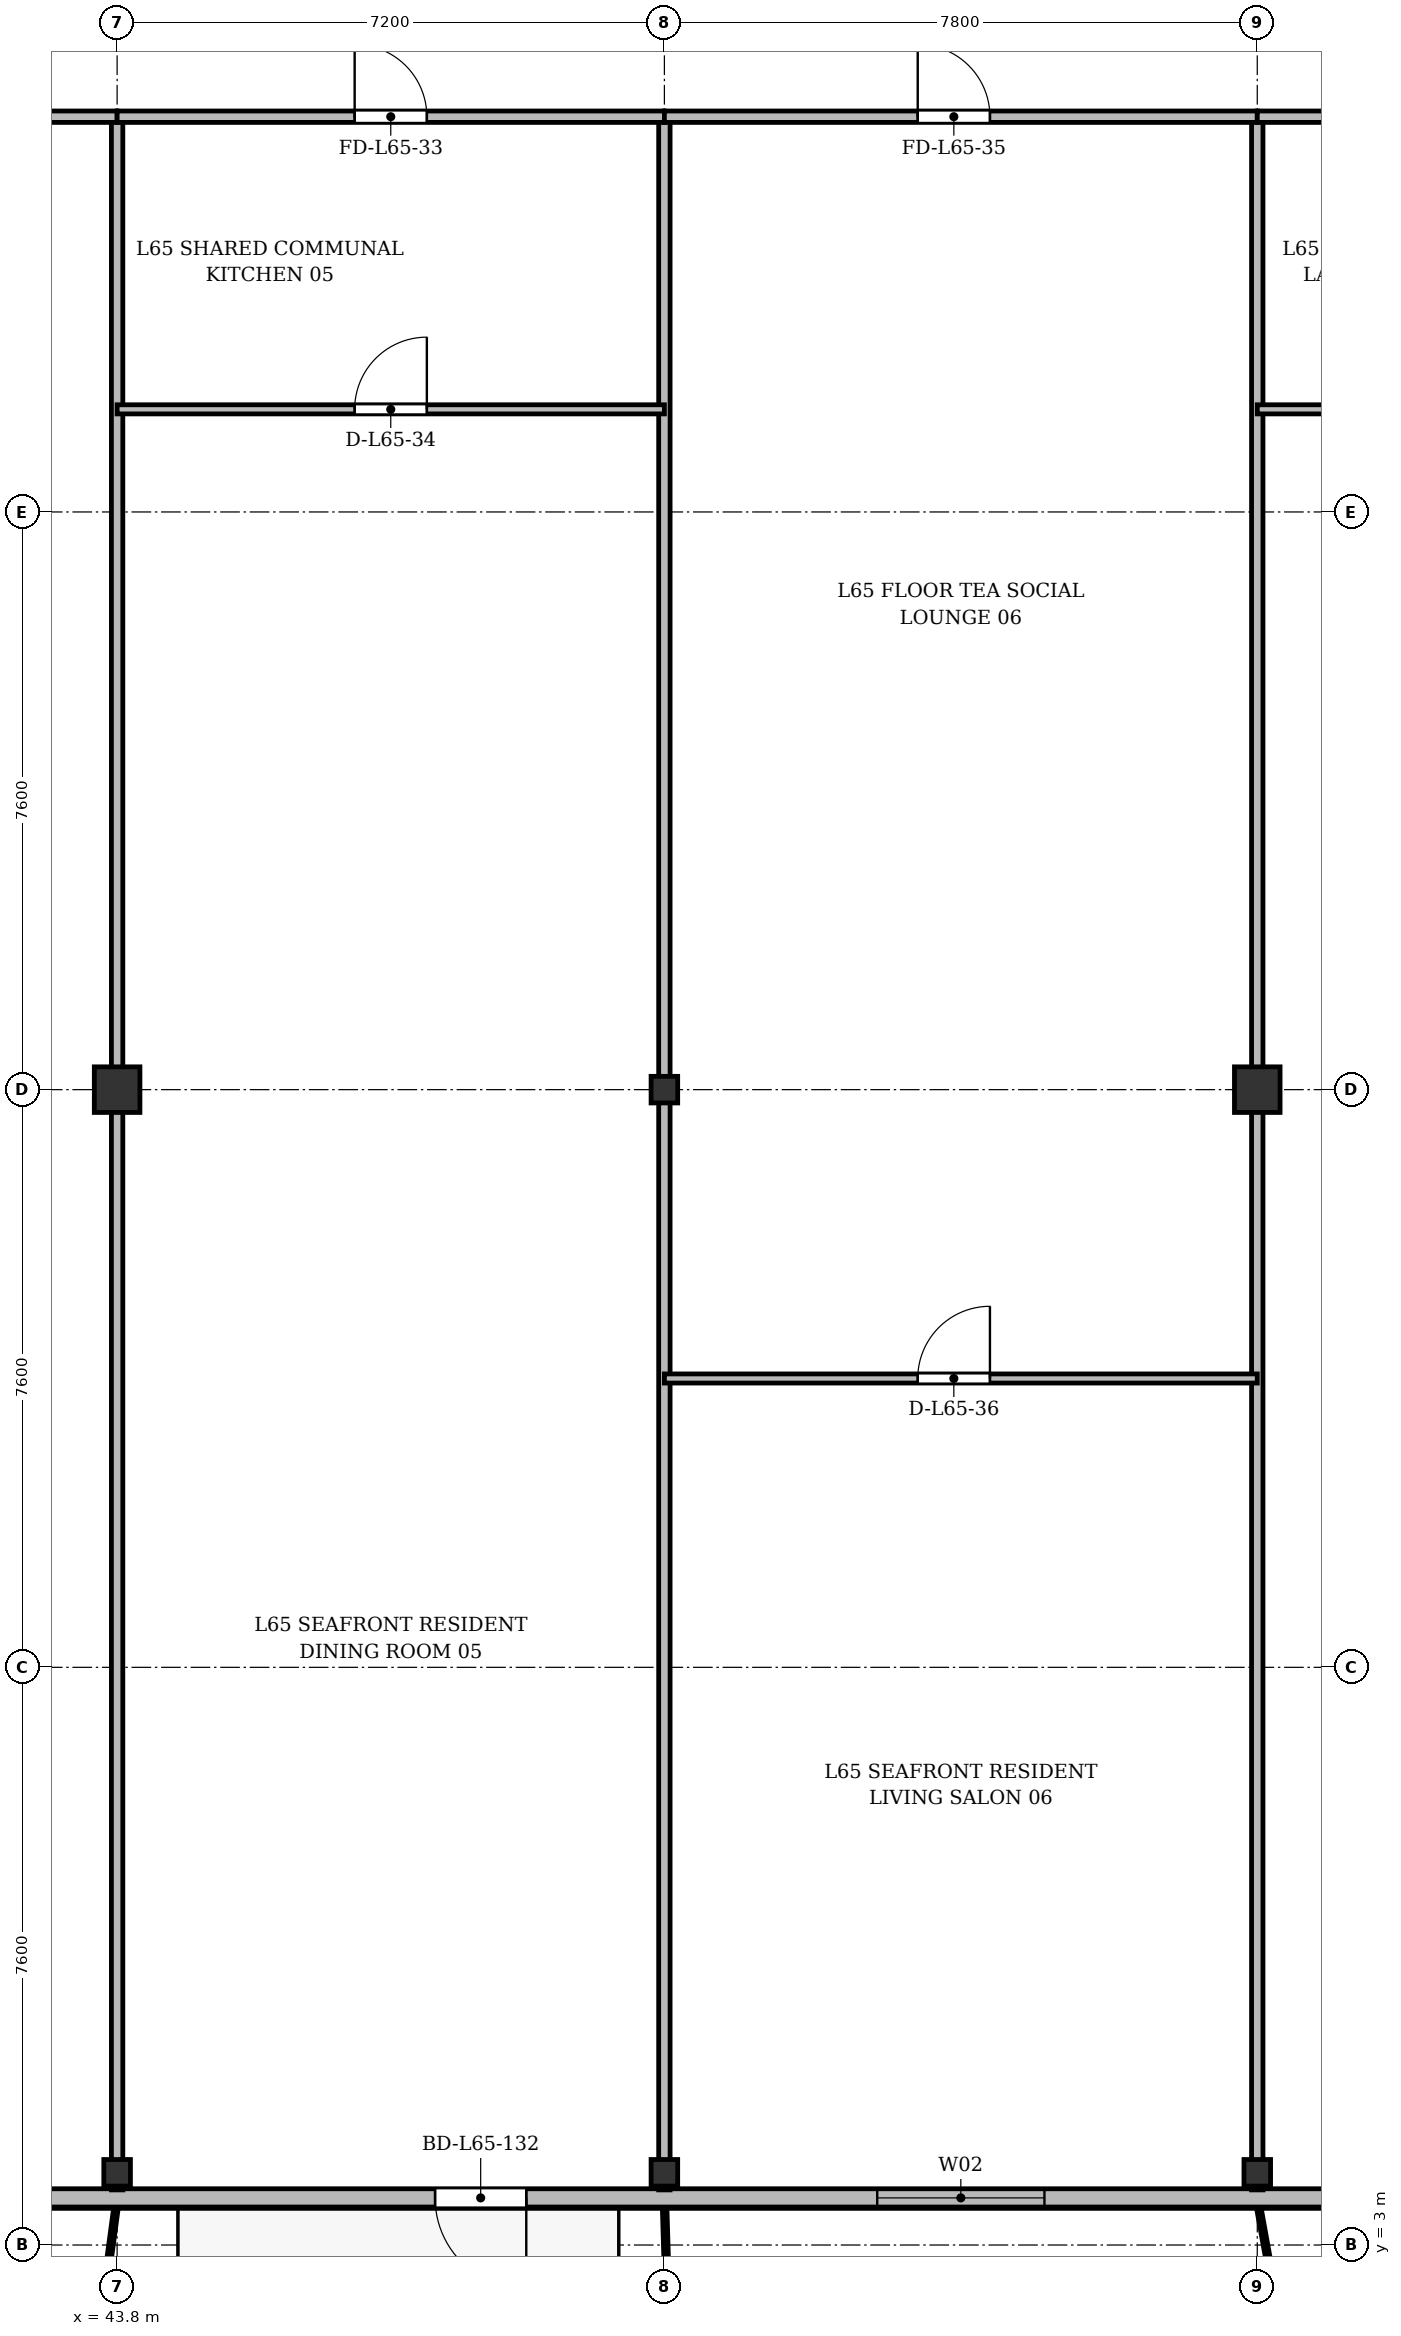
"""IFC4 building model, lengths in metres.
Left out: names, types, materials, properties, quantities, classifications, styles, units other than length and angle.
Written with IfcOpenShell. Run it as: python <this file> out.ifc"""

import sys

from ifc_helpers import new_model, si_unit, direction, frame, frame_2d, origin, origin_2d, place, context, subcontext, project, spatial, rectangle, i_section, extrude, source, transform, mapped, element, fill, save


model = new_model("IFC4")
c1 = context("Model", 3, precision=1e-05, world=origin(), true_north=direction((0.0, 1.0)))
c2 = subcontext(c1, "Body", "Model", "MODEL_VIEW")
j1 = project(units=[si_unit("LENGTHUNIT", "METRE"), si_unit("PLANEANGLEUNIT", "RADIAN")], contexts=[c1])
p1 = place(None, origin())
s1 = spatial("IfcSite", under=j1, at=p1, CompositionType="ELEMENT")
p2 = place(p1, origin())
s2 = spatial("IfcBuilding", under=s1, at=p2, CompositionType="ELEMENT")
p3 = place(p2, frame((0.0, 0.0, 252.3)))
s3 = spatial("IfcBuildingStorey", under=s2, at=p3, CompositionType="ELEMENT", Elevation=252.3)
m1 = source(origin(), c2, "Body", "SweptSolid", [
    extrude(i_section(OverallWidth=0.35, OverallDepth=0.35, WebThickness=0.018, FlangeThickness=0.028, at=origin_2d()), origin(), (0.0, 0.0, 1.0), 3.6),
])
p4 = place(p3, frame((43.8, 3.95, 0.0), z_axis=(0.0, 0.0, 1.0), x_axis=(1.0, 0.0, 0.0)))
e1 = element("IfcColumn", 1, at=p4, inside=s3, PredefinedType="COLUMN", context=c2, shape_type="MappedRepresentation", body=[
    mapped(m1, transform((0.0, 0.0, 0.0), x_axis=(1.0, 0.0, 0.0), y_axis=(0.0, 1.0, 0.0), z_axis=(0.0, 0.0, 1.0), scale=1.0)),
])
m2 = source(origin(), c2, "Body", "SweptSolid", [
    extrude(rectangle(XDim=0.6, YDim=0.6, at=origin_2d()), origin(), (0.0, 0.0, 1.0), 3.6),
])
p5 = place(p3, frame((43.8, 18.2, 0.0), z_axis=(0.0, 0.0, 1.0), x_axis=(1.0, 0.0, 0.0)))
e2 = element("IfcColumn", 2, at=p5, inside=s3, PredefinedType="COLUMN", context=c2, shape_type="MappedRepresentation", body=[
    mapped(m2, transform((0.0, 0.0, 0.0), x_axis=(1.0, 0.0, 0.0), y_axis=(0.0, 1.0, 0.0), z_axis=(0.0, 0.0, 1.0), scale=1.0)),
])
for number, where, z_axis, x_axis in (
    (3, (51.0, 3.95, 0.0), (0.0, 0.0, 1.0), (1.0, 0.0, 0.0)),
    (4, (51.0, 18.2, 0.0), (0.0, 0.0, 1.0), (1.0, 0.0, 0.0)),
    (5, (58.8, 3.95, 0.0), (0.0, 0.0, 1.0), (1.0, 0.0, 0.0)),
):
    element("IfcColumn", number, at=place(p3, frame(where, z_axis=z_axis, x_axis=x_axis)), inside=s3, PredefinedType="COLUMN", context=c2, shape_type="MappedRepresentation", body=[
        mapped(m1, transform((0.0, 0.0, 0.0), x_axis=(1.0, 0.0, 0.0), y_axis=(0.0, 1.0, 0.0), z_axis=(0.0, 0.0, 1.0), scale=1.0)),
    ])
p6 = place(p3, frame((58.8, 18.2, 0.0), z_axis=(0.0, 0.0, 1.0), x_axis=(1.0, 0.0, 0.0)))
e6 = element("IfcColumn", 6, at=p6, inside=s3, PredefinedType="COLUMN", context=c2, shape_type="MappedRepresentation", body=[
    mapped(m2, transform((0.0, 0.0, 0.0), x_axis=(1.0, 0.0, 0.0), y_axis=(0.0, 1.0, 0.0), z_axis=(0.0, 0.0, 1.0), scale=1.0)),
])
p7 = place(p3, frame((63.2, 3.62, 0.0), z_axis=(0.0, 0.0, 1.0), x_axis=(-1.0, 0.0, 0.0)))
e7 = element("IfcWall", 7, at=p7, inside=s3, PredefinedType="SOLIDWALL", context=c2, shape_type="SweptSolid", body=[
    extrude(rectangle(XDim=52.0, YDim=0.24, at=frame_2d((26.0, 0.0))), origin(), (0.0, 0.0, 1.0), 3.37),
])
p8 = place(p7, frame((1.345, 0.0, 0.9)))
e8 = element("IfcOpeningElement", 8, at=p8, cuts=e7, PredefinedType="OPENING", context=c2, shape_type="SweptSolid", body=[
    extrude(rectangle(XDim=1.8, YDim=1.8, at=frame_2d((0.9, 0.9))), frame((0.0, 0.13, 0.0), z_axis=(0.0, -1.0, 0.0), x_axis=(1.0, 0.0, 0.0)), (0.0, 0.0, 1.0), 0.26),
])
p9 = place(p7, frame((7.2, 0.0, 0.9)))
e9 = element("IfcOpeningElement", 9, at=p9, cuts=e7, PredefinedType="OPENING", context=c2, shape_type="SweptSolid", body=[
    extrude(rectangle(XDim=2.2, YDim=1.8, at=frame_2d((1.1, 0.9))), frame((0.0, 0.13, 0.0), z_axis=(0.0, -1.0, 0.0), x_axis=(1.0, 0.0, 0.0)), (0.0, 0.0, 1.0), 0.26),
])
p10 = place(p7, frame((14.017, 0.0, 0.0)))
e10 = element("IfcOpeningElement", 10, at=p10, cuts=e7, PredefinedType="OPENING", context=c2, shape_type="SweptSolid", body=[
    extrude(rectangle(XDim=1.2, YDim=2.2, at=frame_2d((0.6, 1.1))), frame((0.0, 0.13, 0.0), z_axis=(0.0, -1.0, 0.0), x_axis=(1.0, 0.0, 0.0)), (0.0, 0.0, 1.0), 0.26),
])
p11 = place(p7, frame((25.0, 0.0, 0.9)))
e11 = element("IfcOpeningElement", 11, at=p11, cuts=e7, PredefinedType="OPENING", context=c2, shape_type="SweptSolid", body=[
    extrude(rectangle(XDim=2.0, YDim=1.95, at=frame_2d((1.0, 0.975))), frame((0.0, 0.13, 0.0), z_axis=(0.0, -1.0, 0.0), x_axis=(1.0, 0.0, 0.0)), (0.0, 0.0, 1.0), 0.26),
])
p12 = place(p7, frame((35.375, 0.0, 0.9)))
e12 = element("IfcOpeningElement", 12, at=p12, cuts=e7, PredefinedType="OPENING", context=c2, shape_type="SweptSolid", body=[
    extrude(rectangle(XDim=1.65, YDim=1.85, at=frame_2d((0.825, 0.925))), frame((0.0, 0.13, 0.0), z_axis=(0.0, -1.0, 0.0), x_axis=(1.0, 0.0, 0.0)), (0.0, 0.0, 1.0), 0.26),
])
p13 = place(p7, frame((45.302, 0.0, 0.0)))
e13 = element("IfcOpeningElement", 13, at=p13, cuts=e7, PredefinedType="OPENING", context=c2, shape_type="SweptSolid", body=[
    extrude(rectangle(XDim=1.2, YDim=2.2, at=frame_2d((0.6, 1.1))), frame((0.0, 0.13, 0.0), z_axis=(0.0, -1.0, 0.0), x_axis=(1.0, 0.0, 0.0)), (0.0, 0.0, 1.0), 0.26),
])
p14 = place(p7, frame((48.655, 0.0, 0.9)))
e14 = element("IfcOpeningElement", 14, at=p14, cuts=e7, PredefinedType="OPENING", context=c2, shape_type="SweptSolid", body=[
    extrude(rectangle(XDim=2.2, YDim=1.8, at=frame_2d((1.1, 0.9))), frame((0.0, 0.13, 0.0), z_axis=(0.0, -1.0, 0.0), x_axis=(1.0, 0.0, 0.0)), (0.0, 0.0, 1.0), 0.26),
])
for number, where, z_axis, x_axis in (
    (15, (43.8, 3.725, 0.0), (0.0, 0.0, 1.0), (0.0, 1.0, 0.0)),
    (16, (51.0, 3.725, 0.0), (0.0, 0.0, 1.0), (0.0, 1.0, 0.0)),
    (17, (58.8, 3.725, 0.0), (0.0, 0.0, 1.0), (0.0, 1.0, 0.0)),
):
    element("IfcWall", number, at=place(p3, frame(where, z_axis=z_axis, x_axis=x_axis)), inside=s3, PredefinedType="PARTITIONING", context=c2, shape_type="SweptSolid", body=[
        extrude(rectangle(XDim=27.275, YDim=0.15, at=frame_2d((13.637, 0.0))), origin(), (0.0, 0.0, 1.0), 2.87),
    ])
p15 = place(p3, frame((30.6, 31.0, 0.0), z_axis=(0.0, 0.0, 1.0), x_axis=(1.0, 0.0, 0.0)))
e18 = element("IfcWall", 18, at=p15, inside=s3, PredefinedType="PARTITIONING", context=c2, shape_type="SweptSolid", body=[
    extrude(rectangle(XDim=13.2, YDim=0.15, at=frame_2d((6.6, 0.0))), origin(), (0.0, 0.0, 1.0), 2.87),
])
p16 = place(p15, frame((5.8, 0.0, 0.0)))
e19 = element("IfcOpeningElement", 19, at=p16, cuts=e18, PredefinedType="OPENING", context=c2, shape_type="SweptSolid", body=[
    extrude(rectangle(XDim=1.6, YDim=2.2, at=frame_2d((0.8, 1.1))), frame((0.0, 0.085, 0.0), z_axis=(0.0, -1.0, 0.0), x_axis=(1.0, 0.0, 0.0)), (0.0, 0.0, 1.0), 0.17),
])
p17 = place(p3, frame((43.8, 31.0, 0.0), z_axis=(0.0, 0.0, 1.0), x_axis=(1.0, 0.0, 0.0)))
e20 = element("IfcWall", 20, at=p17, inside=s3, PredefinedType="PARTITIONING", context=c2, shape_type="SweptSolid", body=[
    extrude(rectangle(XDim=7.2, YDim=0.15, at=frame_2d((3.6, 0.0))), origin(), (0.0, 0.0, 1.0), 2.87),
])
p18 = place(p17, frame((3.125, 0.0, 0.0)))
e21 = element("IfcOpeningElement", 21, at=p18, cuts=e20, PredefinedType="OPENING", context=c2, shape_type="SweptSolid", body=[
    extrude(rectangle(XDim=0.95, YDim=2.15, at=frame_2d((0.475, 1.075))), frame((0.0, 0.085, 0.0), z_axis=(0.0, -1.0, 0.0), x_axis=(1.0, 0.0, 0.0)), (0.0, 0.0, 1.0), 0.17),
])
p19 = place(p3, frame((43.8, 27.15, 0.0), z_axis=(0.0, 0.0, 1.0), x_axis=(1.0, 0.0, 0.0)))
e22 = element("IfcWall", 22, at=p19, inside=s3, PredefinedType="PARTITIONING", context=c2, shape_type="SweptSolid", body=[
    extrude(rectangle(XDim=7.2, YDim=0.12, at=frame_2d((3.6, 0.0))), origin(), (0.0, 0.0, 1.0), 2.87),
])
p20 = place(p19, frame((3.125, 0.0, 0.0)))
e23 = element("IfcOpeningElement", 23, at=p20, cuts=e22, PredefinedType="OPENING", context=c2, shape_type="SweptSolid", body=[
    extrude(rectangle(XDim=0.95, YDim=2.15, at=frame_2d((0.475, 1.075))), frame((0.0, 0.07, 0.0), z_axis=(0.0, -1.0, 0.0), x_axis=(1.0, 0.0, 0.0)), (0.0, 0.0, 1.0), 0.14),
])
p21 = place(p3, frame((51.0, 31.0, 0.0), z_axis=(0.0, 0.0, 1.0), x_axis=(1.0, 0.0, 0.0)))
e24 = element("IfcWall", 24, at=p21, inside=s3, PredefinedType="PARTITIONING", context=c2, shape_type="SweptSolid", body=[
    extrude(rectangle(XDim=7.8, YDim=0.15, at=frame_2d((3.9, 0.0))), origin(), (0.0, 0.0, 1.0), 2.87),
])
p22 = place(p21, frame((3.333, 0.0, 0.0)))
e25 = element("IfcOpeningElement", 25, at=p22, cuts=e24, PredefinedType="OPENING", context=c2, shape_type="SweptSolid", body=[
    extrude(rectangle(XDim=0.95, YDim=2.15, at=frame_2d((0.475, 1.075))), frame((0.0, 0.085, 0.0), z_axis=(0.0, -1.0, 0.0), x_axis=(1.0, 0.0, 0.0)), (0.0, 0.0, 1.0), 0.17),
])
p23 = place(p3, frame((51.0, 14.4, 0.0), z_axis=(0.0, 0.0, 1.0), x_axis=(1.0, 0.0, 0.0)))
e26 = element("IfcWall", 26, at=p23, inside=s3, PredefinedType="PARTITIONING", context=c2, shape_type="SweptSolid", body=[
    extrude(rectangle(XDim=7.8, YDim=0.12, at=frame_2d((3.9, 0.0))), origin(), (0.0, 0.0, 1.0), 2.87),
])
p24 = place(p23, frame((3.333, 0.0, 0.0)))
e27 = element("IfcOpeningElement", 27, at=p24, cuts=e26, PredefinedType="OPENING", context=c2, shape_type="SweptSolid", body=[
    extrude(rectangle(XDim=0.95, YDim=2.15, at=frame_2d((0.475, 1.075))), frame((0.0, 0.07, 0.0), z_axis=(0.0, -1.0, 0.0), x_axis=(1.0, 0.0, 0.0)), (0.0, 0.0, 1.0), 0.14),
])
p25 = place(p3, frame((58.8, 31.0, 0.0), z_axis=(0.0, 0.0, 1.0), x_axis=(1.0, 0.0, 0.0)))
e28 = element("IfcWall", 28, at=p25, inside=s3, PredefinedType="PARTITIONING", context=c2, shape_type="SweptSolid", body=[
    extrude(rectangle(XDim=7.175, YDim=0.15, at=frame_2d((3.587, 0.0))), origin(), (0.0, 0.0, 1.0), 2.87),
])
p26 = place(p25, frame((3.112, 0.0, 0.0)))
e29 = element("IfcOpeningElement", 29, at=p26, cuts=e28, PredefinedType="OPENING", context=c2, shape_type="SweptSolid", body=[
    extrude(rectangle(XDim=0.95, YDim=2.15, at=frame_2d((0.475, 1.075))), frame((0.0, 0.085, 0.0), z_axis=(0.0, -1.0, 0.0), x_axis=(1.0, 0.0, 0.0)), (0.0, 0.0, 1.0), 0.17),
])
p27 = place(p3, frame((58.8, 27.15, 0.0), z_axis=(0.0, 0.0, 1.0), x_axis=(1.0, 0.0, 0.0)))
e30 = element("IfcWall", 30, at=p27, inside=s3, PredefinedType="PARTITIONING", context=c2, shape_type="SweptSolid", body=[
    extrude(rectangle(XDim=7.175, YDim=0.12, at=frame_2d((3.587, 0.0))), origin(), (0.0, 0.0, 1.0), 2.87),
])
p28 = place(p27, frame((3.112, 0.0, 0.0)))
e31 = element("IfcOpeningElement", 31, at=p28, cuts=e30, PredefinedType="OPENING", context=c2, shape_type="SweptSolid", body=[
    extrude(rectangle(XDim=0.95, YDim=2.15, at=frame_2d((0.475, 1.075))), frame((0.0, 0.07, 0.0), z_axis=(0.0, -1.0, 0.0), x_axis=(1.0, 0.0, 0.0)), (0.0, 0.0, 1.0), 0.14),
])
m3 = source(origin(), c2, "Body", "SweptSolid", [
    extrude(rectangle(XDim=2.2, YDim=1.8, at=frame_2d((1.1, 0.9))), frame((0.0, 0.03, 0.0), z_axis=(0.0, -1.0, 0.0), x_axis=(1.0, 0.0, 0.0)), (0.0, 0.0, 1.0), 0.06),
])
p29 = place(p9, origin())
e32 = element("IfcWindow", 32, at=p29, inside=s3, PartitioningType="SINGLE_PANEL", PredefinedType="WINDOW", context=c2, shape_type="MappedRepresentation", body=[
    mapped(m3, transform((0.0, 0.0, 0.0), x_axis=(1.0, 0.0, 0.0), y_axis=(0.0, 1.0, 0.0), z_axis=(0.0, 0.0, 1.0), scale=1.0)),
])
fill(e9, e32)
m4 = source(origin(), c2, "Body", "SweptSolid", [
    extrude(rectangle(XDim=1.2, YDim=2.2, at=frame_2d((0.6, 1.1))), frame((0.0, 0.025, 0.0), z_axis=(0.0, -1.0, 0.0), x_axis=(1.0, 0.0, 0.0)), (0.0, 0.0, 1.0), 0.05),
])
p30 = place(p10, origin())
e33 = element("IfcDoor", 33, at=p30, inside=s3, OperationType="SINGLE_SWING_LEFT", PredefinedType="DOOR", context=c2, shape_type="MappedRepresentation", body=[
    mapped(m4, transform((0.0, 0.0, 0.0), x_axis=(1.0, 0.0, 0.0), y_axis=(0.0, 1.0, 0.0), z_axis=(0.0, 0.0, 1.0), scale=1.0)),
])
fill(e10, e33)
m5 = source(origin(), c2, "Body", "SweptSolid", [
    extrude(rectangle(XDim=0.95, YDim=2.15, at=frame_2d((0.475, 1.075))), frame((0.0, 0.025, 0.0), z_axis=(0.0, -1.0, 0.0), x_axis=(1.0, 0.0, 0.0)), (0.0, 0.0, 1.0), 0.05),
])
p31 = place(p18, origin())
e34 = element("IfcDoor", 34, at=p31, inside=s3, OperationType="SINGLE_SWING_LEFT", PredefinedType="DOOR", context=c2, shape_type="MappedRepresentation", body=[
    mapped(m5, transform((0.0, 0.0, 0.0), x_axis=(1.0, 0.0, 0.0), y_axis=(0.0, 1.0, 0.0), z_axis=(0.0, 0.0, 1.0), scale=1.0)),
])
fill(e21, e34)
p32 = place(p20, origin())
e35 = element("IfcDoor", 35, at=p32, inside=s3, OperationType="SINGLE_SWING_RIGHT", PredefinedType="DOOR", context=c2, shape_type="MappedRepresentation", body=[
    mapped(m5, transform((0.0, 0.0, 0.0), x_axis=(1.0, 0.0, 0.0), y_axis=(0.0, 1.0, 0.0), z_axis=(0.0, 0.0, 1.0), scale=1.0)),
])
fill(e23, e35)
p33 = place(p22, origin())
e36 = element("IfcDoor", 36, at=p33, inside=s3, OperationType="SINGLE_SWING_LEFT", PredefinedType="DOOR", context=c2, shape_type="MappedRepresentation", body=[
    mapped(m5, transform((0.0, 0.0, 0.0), x_axis=(1.0, 0.0, 0.0), y_axis=(0.0, 1.0, 0.0), z_axis=(0.0, 0.0, 1.0), scale=1.0)),
])
fill(e25, e36)
p34 = place(p24, origin())
e37 = element("IfcDoor", 37, at=p34, inside=s3, OperationType="SINGLE_SWING_RIGHT", PredefinedType="DOOR", context=c2, shape_type="MappedRepresentation", body=[
    mapped(m5, transform((0.0, 0.0, 0.0), x_axis=(1.0, 0.0, 0.0), y_axis=(0.0, 1.0, 0.0), z_axis=(0.0, 0.0, 1.0), scale=1.0)),
])
fill(e27, e37)
save(model, sys.argv[1])
